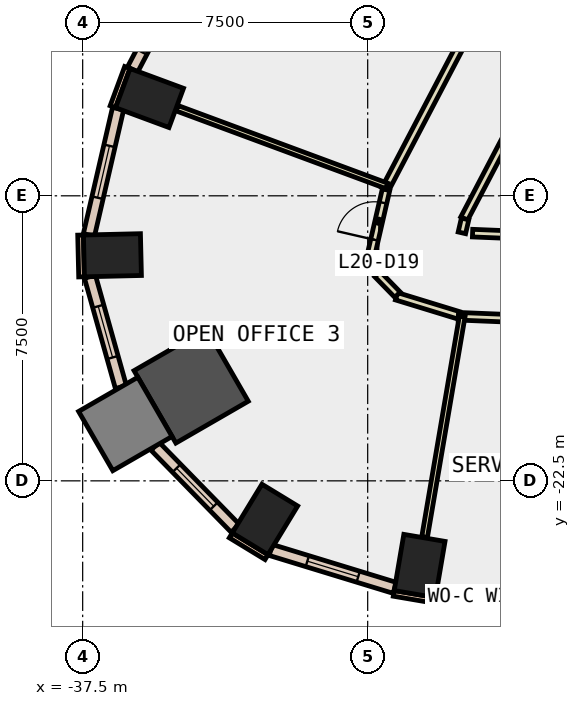
"""IFC4 building model, lengths in metres.
Left out: names, types, materials, properties, quantities, classifications, styles, units other than length and angle.
Written with IfcOpenShell. Run it as: python <this file> out.ifc"""

import sys

from ifc_helpers import new_model, si_unit, direction, frame, frame_2d, origin, origin_2d, place, context, subcontext, project, spatial, rectangle, extrude, element, fill, save


model = new_model("IFC4")
c1 = context("Model", 3, precision=1e-05, world=origin(), true_north=direction((0.0, 1.0)))
c2 = subcontext(c1, "Body", "Model", "MODEL_VIEW")
j1 = project(units=[si_unit("LENGTHUNIT", "METRE"), si_unit("PLANEANGLEUNIT", "RADIAN")], contexts=[c1])
p1 = place(None, origin())
s1 = spatial("IfcSite", under=j1, at=p1, CompositionType="ELEMENT")
p2 = place(p1, origin())
s2 = spatial("IfcBuilding", under=s1, at=p2, CompositionType="ELEMENT")
p3 = place(p2, frame((0.0, 0.0, 95.0)))
s3 = spatial("IfcBuildingStorey", under=s2, at=p3, CompositionType="ELEMENT", Elevation=95.0)
for number, where, z_axis, x_axis in (
    (1, (-28.633, -24.74, -0.4), (0.0, 0.0, 1.0), (-0.986, 0.168, 0.0)),
    (2, (-35.741, -12.427, -0.4), (0.0, 0.0, 1.0), (0.347, 0.938, 0.0)),
    (3, (-36.717, -16.564, -0.4), (0.0, 0.0, 1.0), (-0.023, 1.0, 0.0)),
):
    element("IfcColumn", number, at=place(p3, frame(where, z_axis=z_axis, x_axis=x_axis)), inside=s3, PredefinedType="COLUMN", context=c2, shape_type="SweptSolid", body=[
        extrude(rectangle(XDim=1.1, YDim=1.5, at=origin_2d()), origin(), (0.0, 0.0, 1.0), 4.2),
    ])
p4 = place(p3, frame((-34.645, -20.003, -0.4), z_axis=(0.0, 0.0, 1.0), x_axis=(0.866025403784, 0.5, 0.0)))
e4 = element("IfcColumn", 4, at=p4, inside=s3, PredefinedType="COLUMN", context=c2, shape_type="SweptSolid", body=[
    extrude(rectangle(XDim=2.2, YDim=2.2, at=origin_2d()), origin(), (0.0, 0.0, 1.0), 4.2),
])
p5 = place(p3, frame((-32.703, -23.516, -0.4), z_axis=(0.0, 0.0, 1.0), x_axis=(-0.854095929175, 0.520115510024, 0.0)))
e5 = element("IfcColumn", 5, at=p5, inside=s3, PredefinedType="COLUMN", context=c2, shape_type="SweptSolid", body=[
    extrude(rectangle(XDim=1.1, YDim=1.5, at=origin_2d()), origin(), (0.0, 0.0, 1.0), 4.2),
])
p6 = place(p3, frame((-36.377, -21.003, -0.4), z_axis=(0.0, 0.0, 1.0), x_axis=(0.866025403784, 0.5, 0.0)))
e6 = element("IfcColumn", 6, at=p6, inside=s3, PredefinedType="COLUMN", context=c2, shape_type="SweptSolid", body=[
    extrude(rectangle(XDim=1.8, YDim=1.8, at=origin_2d()), origin(), (0.0, 0.0, 1.0), 4.2),
])
p7 = place(p3, frame((-36.324, -11.624, 0.0), z_axis=(0.0, 0.0, 1.0), x_axis=(-0.347205967468, -0.937788897436, 0.0)))
e7 = element("IfcWall", 7, at=p7, inside=s3, PredefinedType="STANDARD", context=c2, shape_type="SweptSolid", body=[
    extrude(rectangle(XDim=1.1, YDim=0.15, at=frame_2d((0.55, 0.0))), origin(), (0.0, 0.0, 1.0), 3.8),
])
p8 = place(p3, frame((-29.314, -25.461, 0.0), z_axis=(0.0, 0.0, 1.0), x_axis=(0.985763338892, -0.168138751323, 0.0)))
e8 = element("IfcWall", 8, at=p8, inside=s3, PredefinedType="STANDARD", context=c2, shape_type="SweptSolid", body=[
    extrude(rectangle(XDim=1.101, YDim=0.15, at=frame_2d((0.55, 0.0))), origin(), (0.0, 0.0, 1.0), 3.8),
])
for number, where, z_axis, x_axis in (
    (9, (-37.555, -16.033, 0.0), (0.0, 0.0, 1.0), (0.024, -1.0, 0.0)),
    (10, (-33.602, -23.935, 0.0), (0.0, 0.0, 1.0), (0.854, -0.52, 0.0)),
):
    element("IfcWall", number, at=place(p3, frame(where, z_axis=z_axis, x_axis=x_axis)), inside=s3, PredefinedType="STANDARD", context=c2, shape_type="SweptSolid", body=[
        extrude(rectangle(XDim=1.1, YDim=0.15, at=frame_2d((0.55, 0.0))), origin(), (0.0, 0.0, 1.0), 3.8),
    ])
p9 = place(p3, frame((-28.205, -25.501, 0.0), z_axis=(0.0, 0.0, 1.0), x_axis=(0.999159360905, -0.040994774244, 0.0)))
e11 = element("IfcWall", 11, at=p9, inside=s3, PredefinedType="STANDARD", context=c2, shape_type="SweptSolid", body=[
    extrude(rectangle(XDim=5.878, YDim=0.3, at=frame_2d((2.939, 0.0))), origin(), (0.0, 0.0, 1.0), 3.8),
])
p10 = place(p9, frame((0.469, 0.0, 0.9)))
e12 = element("IfcOpeningElement", 12, at=p10, cuts=e11, PredefinedType="OPENING", context=c2, shape_type="SweptSolid", body=[
    extrude(rectangle(XDim=2.0, YDim=2.6, at=frame_2d((1.0, 1.3))), frame((0.0, 0.16, 0.0), z_axis=(0.0, -1.0, 0.0), x_axis=(1.0, 0.0, 0.0)), (0.0, 0.0, 1.0), 0.32),
])
p11 = place(p9, frame((3.408, 0.0, 0.9)))
e13 = element("IfcOpeningElement", 13, at=p11, cuts=e11, PredefinedType="OPENING", context=c2, shape_type="SweptSolid", body=[
    extrude(rectangle(XDim=2.0, YDim=2.6, at=frame_2d((1.0, 1.3))), frame((0.0, 0.16, 0.0), z_axis=(0.0, -1.0, 0.0), x_axis=(1.0, 0.0, 0.0)), (0.0, 0.0, 1.0), 0.32),
])
p12 = place(p3, frame((-33.366, -6.295, 0.0), z_axis=(0.0, 0.0, 1.0), x_axis=(-0.464187178015, -0.885737130173, 0.0)))
e14 = element("IfcWall", 14, at=p12, inside=s3, PredefinedType="STANDARD", context=c2, shape_type="SweptSolid", body=[
    extrude(rectangle(XDim=6.075, YDim=0.3, at=frame_2d((3.038, 0.0))), origin(), (0.0, 0.0, 1.0), 3.8),
])
p13 = place(p12, frame((0.519, 0.0, 0.9)))
e15 = element("IfcOpeningElement", 15, at=p13, cuts=e14, PredefinedType="OPENING", context=c2, shape_type="SweptSolid", body=[
    extrude(rectangle(XDim=2.0, YDim=2.6, at=frame_2d((1.0, 1.3))), frame((0.0, 0.16, 0.0), z_axis=(0.0, -1.0, 0.0), x_axis=(1.0, 0.0, 0.0)), (0.0, 0.0, 1.0), 0.32),
])
p14 = place(p12, frame((3.556, 0.0, 0.9)))
e16 = element("IfcOpeningElement", 16, at=p14, cuts=e14, PredefinedType="OPENING", context=c2, shape_type="SweptSolid", body=[
    extrude(rectangle(XDim=2.0, YDim=2.6, at=frame_2d((1.0, 1.3))), frame((0.0, 0.16, 0.0), z_axis=(0.0, -1.0, 0.0), x_axis=(1.0, 0.0, 0.0)), (0.0, 0.0, 1.0), 0.32),
])
p15 = place(p3, frame((-36.568, -12.706, 0.0), z_axis=(0.0, 0.0, 1.0), x_axis=(-0.224859506699, -0.974391195695, 0.0)))
e17 = element("IfcWall", 17, at=p15, inside=s3, PredefinedType="STANDARD", context=c2, shape_type="SweptSolid", body=[
    extrude(rectangle(XDim=3.41, YDim=0.3, at=frame_2d((1.705, 0.0))), origin(), (0.0, 0.0, 1.0), 3.8),
])
p16 = place(p15, frame((1.005, 0.0, 0.9)))
e18 = element("IfcOpeningElement", 18, at=p16, cuts=e17, PredefinedType="OPENING", context=c2, shape_type="SweptSolid", body=[
    extrude(rectangle(XDim=1.4, YDim=2.6, at=frame_2d((0.7, 1.3))), frame((0.0, 0.16, 0.0), z_axis=(0.0, -1.0, 0.0), x_axis=(1.0, 0.0, 0.0)), (0.0, 0.0, 1.0), 0.32),
])
p17 = place(p3, frame((-37.309, -17.127, 0.0), z_axis=(0.0, 0.0, 1.0), x_axis=(0.270176120308, -0.962810918102, 0.0)))
e19 = element("IfcWall", 19, at=p17, inside=s3, PredefinedType="STANDARD", context=c2, shape_type="SweptSolid", body=[
    extrude(rectangle(XDim=3.017, YDim=0.3, at=frame_2d((1.509, 0.0))), origin(), (0.0, 0.0, 1.0), 3.8),
])
p18 = place(p17, frame((0.809, 0.0, 0.9)))
e20 = element("IfcOpeningElement", 20, at=p18, cuts=e19, PredefinedType="OPENING", context=c2, shape_type="SweptSolid", body=[
    extrude(rectangle(XDim=1.4, YDim=2.6, at=frame_2d((0.7, 1.3))), frame((0.0, 0.16, 0.0), z_axis=(0.0, -1.0, 0.0), x_axis=(1.0, 0.0, 0.0)), (0.0, 0.0, 1.0), 0.32),
])
p19 = place(p3, frame((-35.595, -21.589, 0.0), z_axis=(0.0, 0.0, 1.0), x_axis=(0.698928244773, -0.715191798512, 0.0)))
e21 = element("IfcWall", 21, at=p19, inside=s3, PredefinedType="STANDARD", context=c2, shape_type="SweptSolid", body=[
    extrude(rectangle(XDim=3.017, YDim=0.3, at=frame_2d((1.509, 0.0))), origin(), (0.0, 0.0, 1.0), 3.8),
])
p20 = place(p19, frame((0.809, 0.0, 0.9)))
e22 = element("IfcOpeningElement", 22, at=p20, cuts=e21, PredefinedType="OPENING", context=c2, shape_type="SweptSolid", body=[
    extrude(rectangle(XDim=1.4, YDim=2.6, at=frame_2d((0.7, 1.3))), frame((0.0, 0.16, 0.0), z_axis=(0.0, -1.0, 0.0), x_axis=(1.0, 0.0, 0.0)), (0.0, 0.0, 1.0), 0.32),
])
p21 = place(p3, frame((-32.549, -24.319, 0.0), z_axis=(0.0, 0.0, 1.0), x_axis=(0.956317661006, -0.292329490895, 0.0)))
e23 = element("IfcWall", 23, at=p21, inside=s3, PredefinedType="STANDARD", context=c2, shape_type="SweptSolid", body=[
    extrude(rectangle(XDim=3.41, YDim=0.3, at=frame_2d((1.705, 0.0))), origin(), (0.0, 0.0, 1.0), 3.8),
])
p22 = place(p21, frame((1.005, 0.0, 0.9)))
e24 = element("IfcOpeningElement", 24, at=p22, cuts=e23, PredefinedType="OPENING", context=c2, shape_type="SweptSolid", body=[
    extrude(rectangle(XDim=1.4, YDim=2.6, at=frame_2d((0.7, 1.3))), frame((0.0, 0.16, 0.0), z_axis=(0.0, -1.0, 0.0), x_axis=(1.0, 0.0, 0.0)), (0.0, 0.0, 1.0), 0.32),
])
p23 = place(p3, frame((-24.678, -10.29, 0.0), z_axis=(0.0, 0.0, 1.0), x_axis=(-0.464203280494, -0.885728691179, 0.0)))
e25 = element("IfcWall", 25, at=p23, inside=s3, PredefinedType="PARTITIONING", context=c2, shape_type="SweptSolid", body=[
    extrude(rectangle(XDim=5.995, YDim=0.2, at=frame_2d((2.998, 0.0))), origin(), (0.0, 0.0, 1.0), 3.8),
])
p24 = place(p3, frame((-27.437, -15.609, 0.0), z_axis=(0.0, 0.0, 1.0), x_axis=(-0.224098195188, -0.97456656977, 0.0)))
e26 = element("IfcWall", 26, at=p24, inside=s3, PredefinedType="PARTITIONING", context=c2, shape_type="SweptSolid", body=[
    extrude(rectangle(XDim=0.375, YDim=0.2, at=frame_2d((0.188, 0.0))), origin(), (0.0, 0.0, 1.0), 3.8),
])
p25 = place(p3, frame((-27.24, -15.982, 0.0), z_axis=(0.0, 0.0, 1.0), x_axis=(0.999157128819, -0.041049140426, 0.0)))
e27 = element("IfcWall", 27, at=p25, inside=s3, PredefinedType="PARTITIONING", context=c2, shape_type="SweptSolid", body=[
    extrude(rectangle(XDim=5.799, YDim=0.2, at=frame_2d((2.899, 0.0))), origin(), (0.0, 0.0, 1.0), 3.8),
])
p26 = place(p3, frame((-29.541, -14.829, 0.0), z_axis=(0.0, 0.0, 1.0), x_axis=(0.46422598759, 0.885716790202, 0.0)))
e28 = element("IfcWall", 28, at=p26, inside=s3, PredefinedType="PARTITIONING", context=c2, shape_type="SweptSolid", body=[
    extrude(rectangle(XDim=6.29, YDim=0.2, at=frame_2d((3.145, 0.0))), origin(), (0.0, 0.0, 1.0), 3.8),
])
p27 = place(p3, frame((-27.608, -18.144, 0.0), z_axis=(0.0, 0.0, 1.0), x_axis=(-0.956137025409, 0.292919764852, 0.0)))
e29 = element("IfcWall", 29, at=p27, inside=s3, PredefinedType="PARTITIONING", context=c2, shape_type="SweptSolid", body=[
    extrude(rectangle(XDim=1.707, YDim=0.2, at=frame_2d((0.854, 0.0))), origin(), (0.0, 0.0, 1.0), 3.8),
])
p28 = place(p3, frame((-29.215, -17.602, 0.0), z_axis=(0.0, 0.0, 1.0), x_axis=(-0.698331924638, 0.715774072617, 0.0)))
e30 = element("IfcWall", 30, at=p28, inside=s3, PredefinedType="PARTITIONING", context=c2, shape_type="SweptSolid", body=[
    extrude(rectangle(XDim=0.756, YDim=0.2, at=frame_2d((0.378, 0.0))), origin(), (0.0, 0.0, 1.0), 3.8),
])
p29 = place(p3, frame((-29.701, -17.036, 0.0), z_axis=(0.0, 0.0, 1.0), x_axis=(-0.269792639482, 0.962918444979, 0.0)))
e31 = element("IfcWall", 31, at=p29, inside=s3, PredefinedType="PARTITIONING", context=c2, shape_type="SweptSolid", body=[
    extrude(rectangle(XDim=0.557, YDim=0.2, at=frame_2d((0.278, 0.0))), origin(), (0.0, 0.0, 1.0), 3.8),
])
p30 = place(p3, frame((-29.9, -16.501, 0.0), z_axis=(0.0, 0.0, 1.0), x_axis=(0.224316169854, 0.974516421587, 0.0)))
e32 = element("IfcWall", 32, at=p30, inside=s3, PredefinedType="PARTITIONING", context=c2, shape_type="SweptSolid", body=[
    extrude(rectangle(XDim=1.707, YDim=0.2, at=frame_2d((0.853, 0.0))), origin(), (0.0, 0.0, 1.0), 3.8),
])
p31 = place(p30, frame((0.353, 0.0, 0.0)))
e33 = element("IfcOpeningElement", 33, at=p31, cuts=e32, PredefinedType="OPENING", context=c2, shape_type="SweptSolid", body=[
    extrude(rectangle(XDim=1.0, YDim=2.1, at=frame_2d((0.5, 1.05))), frame((0.0, 0.11, 0.0), z_axis=(0.0, -1.0, 0.0), x_axis=(1.0, 0.0, 0.0)), (0.0, 0.0, 1.0), 0.22),
])
p32 = place(p3, frame((-21.449, -18.422, 0.0), z_axis=(0.0, 0.0, 1.0), x_axis=(-0.999157588083, 0.041037960189, 0.0)))
e34 = element("IfcWall", 34, at=p32, inside=s3, PredefinedType="PARTITIONING", context=c2, shape_type="SweptSolid", body=[
    extrude(rectangle(XDim=6.169, YDim=0.2, at=frame_2d((3.084, 0.0))), origin(), (0.0, 0.0, 1.0), 3.8),
])
p33 = place(p32, frame((2.584, 0.0, 0.0)))
e35 = element("IfcOpeningElement", 35, at=p33, cuts=e34, PredefinedType="OPENING", context=c2, shape_type="SweptSolid", body=[
    extrude(rectangle(XDim=1.0, YDim=2.1, at=frame_2d((0.5, 1.05))), frame((0.0, 0.11, 0.0), z_axis=(0.0, -1.0, 0.0), x_axis=(1.0, 0.0, 0.0)), (0.0, 0.0, 1.0), 0.22),
])
p34 = place(p3, frame((-29.494, -14.741, 0.0), z_axis=(0.0, 0.0, 1.0), x_axis=(-0.937719767819, 0.347392626636, 0.0)))
e36 = element("IfcWall", 36, at=p34, inside=s3, PredefinedType="PARTITIONING", context=c2, shape_type="SweptSolid", body=[
    extrude(rectangle(XDim=5.892, YDim=0.15, at=frame_2d((2.946, 0.0))), origin(), (0.0, 0.0, 1.0), 3.8),
])
p35 = place(p3, frame((-27.513, -18.173, 0.0), z_axis=(0.0, 0.0, 1.0), x_axis=(-0.168033262309, -0.985781326034, 0.0)))
e37 = element("IfcWall", 37, at=p35, inside=s3, PredefinedType="PARTITIONING", context=c2, shape_type="SweptSolid", body=[
    extrude(rectangle(XDim=5.892, YDim=0.15, at=frame_2d((2.946, 0.0))), origin(), (0.0, 0.0, 1.0), 3.8),
])
p36 = place(p10, origin())
e38 = element("IfcWindow", 38, at=p36, inside=s3, PartitioningType="SINGLE_PANEL", PredefinedType="WINDOW", context=c2, shape_type="SweptSolid", body=[
    extrude(rectangle(XDim=2.0, YDim=2.6, at=frame_2d((1.0, 1.3))), frame((0.0, 0.03, 0.0), z_axis=(0.0, -1.0, 0.0), x_axis=(1.0, 0.0, 0.0)), (0.0, 0.0, 1.0), 0.06),
])
fill(e12, e38)
p37 = place(p14, origin())
e39 = element("IfcWindow", 39, at=p37, inside=s3, PartitioningType="SINGLE_PANEL", PredefinedType="WINDOW", context=c2, shape_type="SweptSolid", body=[
    extrude(rectangle(XDim=2.0, YDim=2.6, at=frame_2d((1.0, 1.3))), frame((0.0, 0.03, 0.0), z_axis=(0.0, -1.0, 0.0), x_axis=(1.0, 0.0, 0.0)), (0.0, 0.0, 1.0), 0.06),
])
fill(e16, e39)
p38 = place(p16, origin())
e40 = element("IfcWindow", 40, at=p38, inside=s3, PartitioningType="SINGLE_PANEL", PredefinedType="WINDOW", context=c2, shape_type="SweptSolid", body=[
    extrude(rectangle(XDim=1.4, YDim=2.6, at=frame_2d((0.7, 1.3))), frame((0.0, 0.03, 0.0), z_axis=(0.0, -1.0, 0.0), x_axis=(1.0, 0.0, 0.0)), (0.0, 0.0, 1.0), 0.06),
])
fill(e18, e40)
p39 = place(p18, origin())
e41 = element("IfcWindow", 41, at=p39, inside=s3, PartitioningType="SINGLE_PANEL", PredefinedType="WINDOW", context=c2, shape_type="SweptSolid", body=[
    extrude(rectangle(XDim=1.4, YDim=2.6, at=frame_2d((0.7, 1.3))), frame((0.0, 0.03, 0.0), z_axis=(0.0, -1.0, 0.0), x_axis=(1.0, 0.0, 0.0)), (0.0, 0.0, 1.0), 0.06),
])
fill(e20, e41)
p40 = place(p20, origin())
e42 = element("IfcWindow", 42, at=p40, inside=s3, PartitioningType="SINGLE_PANEL", PredefinedType="WINDOW", context=c2, shape_type="SweptSolid", body=[
    extrude(rectangle(XDim=1.4, YDim=2.6, at=frame_2d((0.7, 1.3))), frame((0.0, 0.03, 0.0), z_axis=(0.0, -1.0, 0.0), x_axis=(1.0, 0.0, 0.0)), (0.0, 0.0, 1.0), 0.06),
])
fill(e22, e42)
p41 = place(p22, origin())
e43 = element("IfcWindow", 43, at=p41, inside=s3, PartitioningType="SINGLE_PANEL", PredefinedType="WINDOW", context=c2, shape_type="SweptSolid", body=[
    extrude(rectangle(XDim=1.4, YDim=2.6, at=frame_2d((0.7, 1.3))), frame((0.0, 0.03, 0.0), z_axis=(0.0, -1.0, 0.0), x_axis=(1.0, 0.0, 0.0)), (0.0, 0.0, 1.0), 0.06),
])
fill(e24, e43)
p42 = place(p31, origin())
e44 = element("IfcDoor", 44, at=p42, inside=s3, OperationType="SINGLE_SWING_RIGHT", PredefinedType="DOOR", context=c2, shape_type="SweptSolid", body=[
    extrude(rectangle(XDim=1.0, YDim=2.1, at=frame_2d((0.5, 1.05))), frame((0.0, 0.025, 0.0), z_axis=(0.0, -1.0, 0.0), x_axis=(1.0, 0.0, 0.0)), (0.0, 0.0, 1.0), 0.05),
])
fill(e33, e44)
save(model, sys.argv[1])
